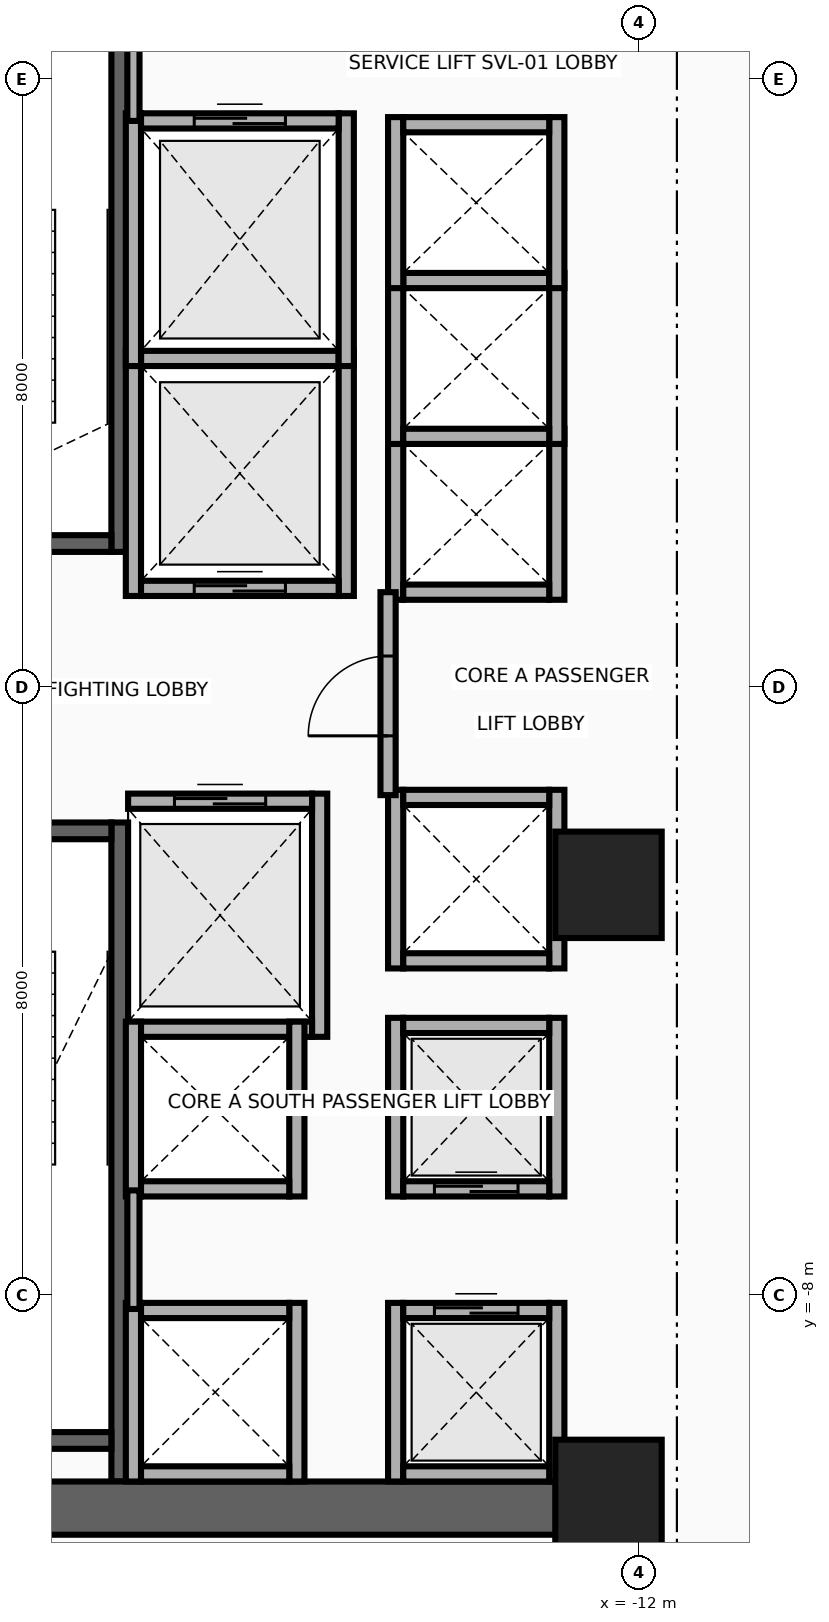
"""IFC4 building model, lengths in metres.
Left out: names, types, materials, properties, quantities, classifications, styles, units other than length and angle.
Written with IfcOpenShell. Run it as: python <this file> out.ifc"""

import sys

from ifc_helpers import new_model, si_unit, direction, frame, frame_2d, origin, origin_2d, place, context, subcontext, project, spatial, rectangle, extrude, source, transform, mapped, element, fill, save


model = new_model("IFC4")
c1 = context("Model", 3, precision=1e-05, world=origin(), true_north=direction((0.0, 1.0)))
c2 = subcontext(c1, "Body", "Model", "MODEL_VIEW")
j1 = project(units=[si_unit("LENGTHUNIT", "METRE"), si_unit("PLANEANGLEUNIT", "RADIAN")], contexts=[c1])
p1 = place(None, origin())
s1 = spatial("IfcSite", under=j1, at=p1, CompositionType="ELEMENT")
p2 = place(p1, origin())
s2 = spatial("IfcBuilding", under=s1, at=p2, CompositionType="ELEMENT")
p3 = place(p2, frame((0.0, 0.0, 29.7)))
s3 = spatial("IfcBuildingStorey", under=s2, at=p3, CompositionType="ELEMENT", Elevation=29.7)
p4 = place(p3, frame((-18.83, 1.78, 0.0), z_axis=(0.0, 0.0, 1.0), x_axis=(0.0, 1.0, 0.0)))
e1 = element("IfcWall", 1, at=p4, inside=s3, PredefinedType="SHEAR", context=c2, shape_type="SweptSolid", body=[
    extrude(rectangle(XDim=8.67, YDim=0.22, at=frame_2d((4.335, 0.0))), origin(), (0.0, 0.0, 1.0), 3.46),
])
p5 = place(p3, frame((-22.05, 1.89, 0.0), z_axis=(0.0, 0.0, 1.0), x_axis=(1.0, 0.0, 0.0)))
e2 = element("IfcWall", 2, at=p5, inside=s3, PredefinedType="SHEAR", context=c2, shape_type="SweptSolid", body=[
    extrude(rectangle(XDim=3.11, YDim=0.22, at=frame_2d((1.555, 0.0))), origin(), (0.0, 0.0, 1.0), 3.46),
])
p6 = place(p5, frame((1.0, 0.0, 0.0)))
e3 = element("IfcOpeningElement", 3, at=p6, cuts=e2, PredefinedType="OPENING", context=c2, shape_type="SweptSolid", body=[
    extrude(rectangle(XDim=1.1, YDim=2.15, at=frame_2d((0.55, 1.075))), frame((0.0, 0.125, 0.0), z_axis=(0.0, -1.0, 0.0), x_axis=(1.0, 0.0, 0.0)), (0.0, 0.0, 1.0), 0.25),
])
p7 = place(p3, frame((-18.83, -10.45, 0.0), z_axis=(0.0, 0.0, 1.0), x_axis=(0.0, 1.0, 0.0)))
e4 = element("IfcWall", 4, at=p7, inside=s3, PredefinedType="SHEAR", context=c2, shape_type="SweptSolid", body=[
    extrude(rectangle(XDim=8.67, YDim=0.22, at=frame_2d((4.335, 0.0))), origin(), (0.0, 0.0, 1.0), 3.46),
])
p8 = place(p3, frame((-22.05, -9.91, 0.0), z_axis=(0.0, 0.0, 1.0), x_axis=(1.0, 0.0, 0.0)))
e5 = element("IfcWall", 5, at=p8, inside=s3, PredefinedType="SHEAR", context=c2, shape_type="SweptSolid", body=[
    extrude(rectangle(XDim=3.11, YDim=0.22, at=frame_2d((1.555, 0.0))), origin(), (0.0, 0.0, 1.0), 3.46),
])
p9 = place(p3, frame((-22.05, -1.89, 0.0), z_axis=(0.0, 0.0, 1.0), x_axis=(1.0, 0.0, 0.0)))
e6 = element("IfcWall", 6, at=p9, inside=s3, PredefinedType="SHEAR", context=c2, shape_type="SweptSolid", body=[
    extrude(rectangle(XDim=3.11, YDim=0.22, at=frame_2d((1.555, 0.0))), origin(), (0.0, 0.0, 1.0), 3.46),
])
p10 = place(p9, frame((1.0, 0.0, 0.0)))
e7 = element("IfcOpeningElement", 7, at=p10, cuts=e6, PredefinedType="OPENING", context=c2, shape_type="SweptSolid", body=[
    extrude(rectangle(XDim=1.1, YDim=2.15, at=frame_2d((0.55, 1.075))), frame((0.0, 0.125, 0.0), z_axis=(0.0, -1.0, 0.0), x_axis=(1.0, 0.0, 0.0)), (0.0, 0.0, 1.0), 0.25),
])
p11 = place(p3, frame((-22.65, -10.8, 0.0), z_axis=(0.0, 0.0, 1.0), x_axis=(1.0, 0.0, 0.0)))
e8 = element("IfcWall", 8, at=p11, inside=s3, PredefinedType="SHEAR", context=c2, shape_type="SweptSolid", body=[
    extrude(rectangle(XDim=10.25, YDim=0.7, at=frame_2d((5.125, 0.0))), origin(), (0.0, 0.0, 1.0), 3.46),
])
m1 = source(origin(), c2, "Body", "SweptSolid", [
    extrude(rectangle(XDim=1.4, YDim=1.4, at=origin_2d()), origin(), (0.0, 0.0, 1.0), 3.7),
])
for number, where, z_axis, x_axis in (
    (9, (-12.4, -10.6, 0.0), (0.0, 0.0, 1.0), (1.0, 0.0, 0.0)),
    (10, (-12.4, -2.6, 0.0), (0.0, 0.0, 1.0), (1.0, 0.0, 0.0)),
):
    element("IfcColumn", number, at=place(p3, frame(where, z_axis=z_axis, x_axis=x_axis)), inside=s3, PredefinedType="COLUMN", context=c2, shape_type="MappedRepresentation", body=[
        mapped(m1, transform((0.0, 0.0, 0.0), x_axis=(1.0, 0.0, 0.0), y_axis=(0.0, 1.0, 0.0), z_axis=(0.0, 0.0, 1.0), scale=1.0)),
    ])
for number, where, z_axis, x_axis in (
    (11, (-18.65, 1.2, 0.0), (0.0, 0.0, 1.0), (0.0, 1.0, 0.0)),
    (12, (-15.85, 1.2, 0.0), (0.0, 0.0, 1.0), (0.0, 1.0, 0.0)),
):
    element("IfcWall", number, at=place(p3, frame(where, z_axis=z_axis, x_axis=x_axis)), inside=s3, PredefinedType="MOVABLE", context=c2, shape_type="SweptSolid", body=[
        extrude(rectangle(XDim=3.225, YDim=0.2, at=frame_2d((1.613, 0.0))), origin(), (0.0, 0.0, 1.0), 3.46),
    ])
p12 = place(p3, frame((-18.55, 1.3, 0.0), z_axis=(0.0, 0.0, 1.0), x_axis=(1.0, 0.0, 0.0)))
e13 = element("IfcWall", 13, at=p12, inside=s3, PredefinedType="MOVABLE", context=c2, shape_type="SweptSolid", body=[
    extrude(rectangle(XDim=2.6, YDim=0.2, at=frame_2d((1.3, 0.0))), origin(), (0.0, 0.0, 1.0), 3.46),
])
p13 = place(p12, frame((0.7, 0.0, 0.0)))
e14 = element("IfcOpeningElement", 14, at=p13, cuts=e13, PredefinedType="OPENING", context=c2, shape_type="SweptSolid", body=[
    extrude(rectangle(XDim=1.2, YDim=2.1, at=frame_2d((0.6, 1.05))), frame((0.0, 0.115, 0.0), z_axis=(0.0, -1.0, 0.0), x_axis=(1.0, 0.0, 0.0)), (0.0, 0.0, 1.0), 0.23),
])
p14 = place(p3, frame((-18.55, 4.325, 0.0), z_axis=(0.0, 0.0, 1.0), x_axis=(1.0, 0.0, 0.0)))
e15 = element("IfcWall", 15, at=p14, inside=s3, PredefinedType="MOVABLE", context=c2, shape_type="SweptSolid", body=[
    extrude(rectangle(XDim=2.6, YDim=0.2, at=frame_2d((1.3, 0.0))), origin(), (0.0, 0.0, 1.0), 3.46),
])
p15 = place(p3, frame((-16.2, -4.6, 0.0), z_axis=(0.0, 0.0, 1.0), x_axis=(0.0, 1.0, 0.0)))
e16 = element("IfcWall", 16, at=p15, inside=s3, PredefinedType="MOVABLE", context=c2, shape_type="SweptSolid", body=[
    extrude(rectangle(XDim=3.2, YDim=0.2, at=frame_2d((1.6, 0.0))), origin(), (0.0, 0.0, 1.0), 3.46),
])
p16 = place(p3, frame((-18.72, -4.5, 0.0), z_axis=(0.0, 0.0, 1.0), x_axis=(1.0, 0.0, 0.0)))
e17 = element("IfcWall", 17, at=p16, inside=s3, PredefinedType="MOVABLE", context=c2, shape_type="SweptSolid", body=[
    extrude(rectangle(XDim=2.42, YDim=0.2, at=frame_2d((1.21, 0.0))), origin(), (0.0, 0.0, 1.0), 3.46),
])
p17 = place(p3, frame((-18.72, -1.5, 0.0), z_axis=(0.0, 0.0, 1.0), x_axis=(1.0, 0.0, 0.0)))
e18 = element("IfcWall", 18, at=p17, inside=s3, PredefinedType="MOVABLE", context=c2, shape_type="SweptSolid", body=[
    extrude(rectangle(XDim=2.42, YDim=0.2, at=frame_2d((1.21, 0.0))), origin(), (0.0, 0.0, 1.0), 3.46),
])
p18 = place(p17, frame((0.61, 0.0, 0.0)))
e19 = element("IfcOpeningElement", 19, at=p18, cuts=e18, PredefinedType="OPENING", context=c2, shape_type="SweptSolid", body=[
    extrude(rectangle(XDim=1.2, YDim=2.1, at=frame_2d((0.6, 1.05))), frame((0.0, 0.115, 0.0), z_axis=(0.0, -1.0, 0.0), x_axis=(1.0, 0.0, 0.0)), (0.0, 0.0, 1.0), 0.23),
])
for number, where, z_axis, x_axis in (
    (20, (-18.65, 4.225, 0.0), (0.0, 0.0, 1.0), (0.0, 1.0, 0.0)),
    (21, (-15.85, 4.225, 0.0), (0.0, 0.0, 1.0), (0.0, 1.0, 0.0)),
):
    element("IfcWall", number, at=place(p3, frame(where, z_axis=z_axis, x_axis=x_axis)), inside=s3, PredefinedType="MOVABLE", context=c2, shape_type="SweptSolid", body=[
        extrude(rectangle(XDim=3.325, YDim=0.2, at=frame_2d((1.663, 0.0))), origin(), (0.0, 0.0, 1.0), 3.46),
    ])
p19 = place(p3, frame((-18.55, 7.45, 0.0), z_axis=(0.0, 0.0, 1.0), x_axis=(1.0, 0.0, 0.0)))
e22 = element("IfcWall", 22, at=p19, inside=s3, PredefinedType="MOVABLE", context=c2, shape_type="SweptSolid", body=[
    extrude(rectangle(XDim=2.6, YDim=0.2, at=frame_2d((1.3, 0.0))), origin(), (0.0, 0.0, 1.0), 3.46),
])
p20 = place(p19, frame((0.7, 0.0, 0.0)))
e23 = element("IfcOpeningElement", 23, at=p20, cuts=e22, PredefinedType="OPENING", context=c2, shape_type="SweptSolid", body=[
    extrude(rectangle(XDim=1.2, YDim=2.1, at=frame_2d((0.6, 1.05))), frame((0.0, 0.115, 0.0), z_axis=(0.0, -1.0, 0.0), x_axis=(1.0, 0.0, 0.0)), (0.0, 0.0, 1.0), 0.23),
])
for number, where, z_axis, x_axis in (
    (24, (-15.2, -10.45, 0.0), (0.0, 0.0, 1.0), (0.0, 1.0, 0.0)),
    (25, (-13.08, -10.45, 0.0), (0.0, 0.0, 1.0), (0.0, 1.0, 0.0)),
):
    element("IfcWall", number, at=place(p3, frame(where, z_axis=z_axis, x_axis=x_axis)), inside=s3, PredefinedType="MOVABLE", context=c2, shape_type="SweptSolid", body=[
        extrude(rectangle(XDim=2.35, YDim=0.2, at=frame_2d((1.175, 0.0))), origin(), (0.0, 0.0, 1.0), 2.583),
    ])
p21 = place(p3, frame((-15.1, -10.35, 0.0), z_axis=(0.0, 0.0, 1.0), x_axis=(1.0, 0.0, 0.0)))
e26 = element("IfcWall", 26, at=p21, inside=s3, PredefinedType="MOVABLE", context=c2, shape_type="SweptSolid", body=[
    extrude(rectangle(XDim=1.92, YDim=0.2, at=frame_2d((0.96, 0.0))), origin(), (0.0, 0.0, 1.0), 2.583),
])
p22 = place(p3, frame((-15.1, -8.2, 0.0), z_axis=(0.0, 0.0, 1.0), x_axis=(1.0, 0.0, 0.0)))
e27 = element("IfcWall", 27, at=p22, inside=s3, PredefinedType="MOVABLE", context=c2, shape_type="SweptSolid", body=[
    extrude(rectangle(XDim=1.92, YDim=0.2, at=frame_2d((0.96, 0.0))), origin(), (0.0, 0.0, 1.0), 3.46),
])
p23 = place(p22, frame((0.41, 0.0, 0.0)))
e28 = element("IfcOpeningElement", 28, at=p23, cuts=e27, PredefinedType="OPENING", context=c2, shape_type="SweptSolid", body=[
    extrude(rectangle(XDim=1.1, YDim=2.1, at=frame_2d((0.55, 1.05))), frame((0.0, 0.115, 0.0), z_axis=(0.0, -1.0, 0.0), x_axis=(1.0, 0.0, 0.0)), (0.0, 0.0, 1.0), 0.23),
])
for number, where, z_axis, x_axis in (
    (29, (-15.2, -6.7, 0.0), (0.0, 0.0, 1.0), (0.0, 1.0, 0.0)),
    (30, (-13.08, -6.7, 0.0), (0.0, 0.0, 1.0), (0.0, 1.0, 0.0)),
):
    element("IfcWall", number, at=place(p3, frame(where, z_axis=z_axis, x_axis=x_axis)), inside=s3, PredefinedType="MOVABLE", context=c2, shape_type="SweptSolid", body=[
        extrude(rectangle(XDim=2.35, YDim=0.2, at=frame_2d((1.175, 0.0))), origin(), (0.0, 0.0, 1.0), 3.46),
    ])
p24 = place(p3, frame((-15.1, -6.6, 0.0), z_axis=(0.0, 0.0, 1.0), x_axis=(1.0, 0.0, 0.0)))
e31 = element("IfcWall", 31, at=p24, inside=s3, PredefinedType="MOVABLE", context=c2, shape_type="SweptSolid", body=[
    extrude(rectangle(XDim=1.92, YDim=0.2, at=frame_2d((0.96, 0.0))), origin(), (0.0, 0.0, 1.0), 3.46),
])
p25 = place(p24, frame((0.41, 0.0, 0.0)))
e32 = element("IfcOpeningElement", 32, at=p25, cuts=e31, PredefinedType="OPENING", context=c2, shape_type="SweptSolid", body=[
    extrude(rectangle(XDim=1.1, YDim=2.1, at=frame_2d((0.55, 1.05))), frame((0.0, 0.115, 0.0), z_axis=(0.0, -1.0, 0.0), x_axis=(1.0, 0.0, 0.0)), (0.0, 0.0, 1.0), 0.23),
])
p26 = place(p3, frame((-15.1, -4.45, 0.0), z_axis=(0.0, 0.0, 1.0), x_axis=(1.0, 0.0, 0.0)))
e33 = element("IfcWall", 33, at=p26, inside=s3, PredefinedType="MOVABLE", context=c2, shape_type="SweptSolid", body=[
    extrude(rectangle(XDim=1.92, YDim=0.2, at=frame_2d((0.96, 0.0))), origin(), (0.0, 0.0, 1.0), 3.46),
])
for number, where, z_axis, x_axis in (
    (34, (-18.65, -10.45, 0.0), (0.0, 0.0, 1.0), (0.0, 1.0, 0.0)),
    (35, (-16.5, -10.45, 0.0), (0.0, 0.0, 1.0), (0.0, 1.0, 0.0)),
):
    element("IfcWall", number, at=place(p3, frame(where, z_axis=z_axis, x_axis=x_axis)), inside=s3, PredefinedType="MOVABLE", context=c2, shape_type="SweptSolid", body=[
        extrude(rectangle(XDim=2.35, YDim=0.2, at=frame_2d((1.175, 0.0))), origin(), (0.0, 0.0, 1.0), 2.583),
    ])
p27 = place(p3, frame((-18.55, -10.35, 0.0), z_axis=(0.0, 0.0, 1.0), x_axis=(1.0, 0.0, 0.0)))
e36 = element("IfcWall", 36, at=p27, inside=s3, PredefinedType="MOVABLE", context=c2, shape_type="SweptSolid", body=[
    extrude(rectangle(XDim=1.95, YDim=0.2, at=frame_2d((0.975, 0.0))), origin(), (0.0, 0.0, 1.0), 2.583),
])
p28 = place(p3, frame((-18.55, -8.2, 0.0), z_axis=(0.0, 0.0, 1.0), x_axis=(1.0, 0.0, 0.0)))
e37 = element("IfcWall", 37, at=p28, inside=s3, PredefinedType="MOVABLE", context=c2, shape_type="SweptSolid", body=[
    extrude(rectangle(XDim=1.95, YDim=0.2, at=frame_2d((0.975, 0.0))), origin(), (0.0, 0.0, 1.0), 3.46),
])
for number, where, z_axis, x_axis in (
    (38, (-15.2, 1.15, 0.0), (0.0, 0.0, 1.0), (0.0, 1.0, 0.0)),
    (39, (-13.08, 1.15, 0.0), (0.0, 0.0, 1.0), (0.0, 1.0, 0.0)),
):
    element("IfcWall", number, at=place(p3, frame(where, z_axis=z_axis, x_axis=x_axis)), inside=s3, PredefinedType="MOVABLE", context=c2, shape_type="SweptSolid", body=[
        extrude(rectangle(XDim=2.25, YDim=0.2, at=frame_2d((1.125, 0.0))), origin(), (0.0, 0.0, 1.0), 3.46),
    ])
p29 = place(p3, frame((-15.1, 1.25, 0.0), z_axis=(0.0, 0.0, 1.0), x_axis=(1.0, 0.0, 0.0)))
e40 = element("IfcWall", 40, at=p29, inside=s3, PredefinedType="MOVABLE", context=c2, shape_type="SweptSolid", body=[
    extrude(rectangle(XDim=1.92, YDim=0.2, at=frame_2d((0.96, 0.0))), origin(), (0.0, 0.0, 1.0), 3.46),
])
for number, where, z_axis, x_axis in (
    (41, (-15.2, 3.2, 0.0), (0.0, 0.0, 1.0), (0.0, 1.0, 0.0)),
    (42, (-13.08, 3.2, 0.0), (0.0, 0.0, 1.0), (0.0, 1.0, 0.0)),
):
    element("IfcWall", number, at=place(p3, frame(where, z_axis=z_axis, x_axis=x_axis)), inside=s3, PredefinedType="MOVABLE", context=c2, shape_type="SweptSolid", body=[
        extrude(rectangle(XDim=2.25, YDim=0.2, at=frame_2d((1.125, 0.0))), origin(), (0.0, 0.0, 1.0), 3.46),
    ])
for number, where, z_axis, x_axis in (
    (43, (-15.1, 3.3, 0.0), (0.0, 0.0, 1.0), (1.0, 0.0, 0.0)),
    (44, (-15.1, 5.35, 0.0), (0.0, 0.0, 1.0), (1.0, 0.0, 0.0)),
):
    element("IfcWall", number, at=place(p3, frame(where, z_axis=z_axis, x_axis=x_axis)), inside=s3, PredefinedType="MOVABLE", context=c2, shape_type="SweptSolid", body=[
        extrude(rectangle(XDim=1.92, YDim=0.2, at=frame_2d((0.96, 0.0))), origin(), (0.0, 0.0, 1.0), 3.46),
    ])
for number, where, z_axis, x_axis in (
    (45, (-15.2, 5.25, 0.0), (0.0, 0.0, 1.0), (0.0, 1.0, 0.0)),
    (46, (-13.08, 5.25, 0.0), (0.0, 0.0, 1.0), (0.0, 1.0, 0.0)),
):
    element("IfcWall", number, at=place(p3, frame(where, z_axis=z_axis, x_axis=x_axis)), inside=s3, PredefinedType="MOVABLE", context=c2, shape_type="SweptSolid", body=[
        extrude(rectangle(XDim=2.25, YDim=0.2, at=frame_2d((1.125, 0.0))), origin(), (0.0, 0.0, 1.0), 3.46),
    ])
p30 = place(p3, frame((-15.1, 7.4, 0.0), z_axis=(0.0, 0.0, 1.0), x_axis=(1.0, 0.0, 0.0)))
e47 = element("IfcWall", 47, at=p30, inside=s3, PredefinedType="MOVABLE", context=c2, shape_type="SweptSolid", body=[
    extrude(rectangle(XDim=1.92, YDim=0.2, at=frame_2d((0.96, 0.0))), origin(), (0.0, 0.0, 1.0), 3.46),
])
for number, where, z_axis, x_axis in (
    (48, (-18.65, -6.7, 0.0), (0.0, 0.0, 1.0), (0.0, 1.0, 0.0)),
    (49, (-16.5, -6.7, 0.0), (0.0, 0.0, 1.0), (0.0, 1.0, 0.0)),
):
    element("IfcWall", number, at=place(p3, frame(where, z_axis=z_axis, x_axis=x_axis)), inside=s3, PredefinedType="MOVABLE", context=c2, shape_type="SweptSolid", body=[
        extrude(rectangle(XDim=2.3, YDim=0.2, at=frame_2d((1.15, 0.0))), origin(), (0.0, 0.0, 1.0), 3.46),
    ])
p31 = place(p3, frame((-18.55, -6.6, 0.0), z_axis=(0.0, 0.0, 1.0), x_axis=(1.0, 0.0, 0.0)))
e50 = element("IfcWall", 50, at=p31, inside=s3, PredefinedType="MOVABLE", context=c2, shape_type="SweptSolid", body=[
    extrude(rectangle(XDim=1.95, YDim=0.2, at=frame_2d((0.975, 0.0))), origin(), (0.0, 0.0, 1.0), 3.46),
])
for number, where, z_axis, x_axis in (
    (51, (-15.2, -3.7, 0.0), (0.0, 0.0, 1.0), (0.0, 1.0, 0.0)),
    (52, (-13.08, -3.7, 0.0), (0.0, 0.0, 1.0), (0.0, 1.0, 0.0)),
):
    element("IfcWall", number, at=place(p3, frame(where, z_axis=z_axis, x_axis=x_axis)), inside=s3, PredefinedType="MOVABLE", context=c2, shape_type="SweptSolid", body=[
        extrude(rectangle(XDim=2.35, YDim=0.2, at=frame_2d((1.175, 0.0))), origin(), (0.0, 0.0, 1.0), 3.46),
    ])
for number, where, z_axis, x_axis in (
    (53, (-15.1, -3.6, 0.0), (0.0, 0.0, 1.0), (1.0, 0.0, 0.0)),
    (54, (-15.1, -1.45, 0.0), (0.0, 0.0, 1.0), (1.0, 0.0, 0.0)),
):
    element("IfcWall", number, at=place(p3, frame(where, z_axis=z_axis, x_axis=x_axis)), inside=s3, PredefinedType="MOVABLE", context=c2, shape_type="SweptSolid", body=[
        extrude(rectangle(XDim=1.92, YDim=0.2, at=frame_2d((0.96, 0.0))), origin(), (0.0, 0.0, 1.0), 3.46),
    ])
p32 = place(p3, frame((-15.3, -1.42, 0.0), z_axis=(0.0, 0.0, 1.0), x_axis=(0.0, 1.0, 0.0)))
e55 = element("IfcWall", 55, at=p32, inside=s3, PredefinedType="PARTITIONING", context=c2, shape_type="SweptSolid", body=[
    extrude(rectangle(XDim=2.67, YDim=0.2, at=frame_2d((1.335, 0.0))), origin(), (0.0, 0.0, 1.0), 3.46),
])
p33 = place(p32, frame((0.78, 0.0, 0.0)))
e56 = element("IfcOpeningElement", 56, at=p33, cuts=e55, PredefinedType="OPENING", context=c2, shape_type="SweptSolid", body=[
    extrude(rectangle(XDim=1.05, YDim=2.15, at=frame_2d((0.525, 1.075))), frame((0.0, 0.115, 0.0), z_axis=(0.0, -1.0, 0.0), x_axis=(1.0, 0.0, 0.0)), (0.0, 0.0, 1.0), 0.23),
])
p34 = place(p3, frame((-18.65, 7.45, 0.0), z_axis=(0.0, 0.0, 1.0), x_axis=(0.0, 1.0, 0.0)))
e57 = element("IfcWall", 57, at=p34, inside=s3, PredefinedType="PARTITIONING", context=c2, shape_type="SweptSolid", body=[
    extrude(rectangle(XDim=2.93, YDim=0.16, at=frame_2d((1.465, 0.0))), origin(), (0.0, 0.0, 1.0), 3.46),
])
p35 = place(p3, frame((-18.65, -8.18, 0.0), z_axis=(0.0, 0.0, 1.0), x_axis=(0.0, 1.0, 0.0)))
e58 = element("IfcWall", 58, at=p35, inside=s3, PredefinedType="PARTITIONING", context=c2, shape_type="SweptSolid", body=[
    extrude(rectangle(XDim=1.56, YDim=0.16, at=frame_2d((0.78, 0.0))), origin(), (0.0, 0.0, 1.0), 3.46),
])
p36 = place(p13, origin())
e59 = element("IfcDoor", 59, at=p36, inside=s3, OperationType="DOUBLE_DOOR_SLIDING", PredefinedType="DOOR", context=c2, shape_type="SweptSolid", body=[
    extrude(rectangle(XDim=1.2, YDim=2.1, at=frame_2d((0.6, 1.05))), frame((0.0, 0.025, 0.0), z_axis=(0.0, -1.0, 0.0), x_axis=(1.0, 0.0, 0.0)), (0.0, 0.0, 1.0), 0.05),
])
fill(e14, e59)
p37 = place(p18, origin())
e60 = element("IfcDoor", 60, at=p37, inside=s3, OperationType="DOUBLE_DOOR_SLIDING", PredefinedType="DOOR", context=c2, shape_type="SweptSolid", body=[
    extrude(rectangle(XDim=1.2, YDim=2.1, at=frame_2d((0.6, 1.05))), frame((0.0, 0.025, 0.0), z_axis=(0.0, -1.0, 0.0), x_axis=(1.0, 0.0, 0.0)), (0.0, 0.0, 1.0), 0.05),
])
fill(e19, e60)
p38 = place(p20, origin())
e61 = element("IfcDoor", 61, at=p38, inside=s3, OperationType="DOUBLE_DOOR_SLIDING", PredefinedType="DOOR", context=c2, shape_type="SweptSolid", body=[
    extrude(rectangle(XDim=1.2, YDim=2.1, at=frame_2d((0.6, 1.05))), frame((0.0, 0.025, 0.0), z_axis=(0.0, -1.0, 0.0), x_axis=(1.0, 0.0, 0.0)), (0.0, 0.0, 1.0), 0.05),
])
fill(e23, e61)
p39 = place(p23, origin())
e62 = element("IfcDoor", 62, at=p39, inside=s3, OperationType="DOUBLE_DOOR_SLIDING", PredefinedType="DOOR", context=c2, shape_type="SweptSolid", body=[
    extrude(rectangle(XDim=1.1, YDim=2.1, at=frame_2d((0.55, 1.05))), frame((0.0, 0.025, 0.0), z_axis=(0.0, -1.0, 0.0), x_axis=(1.0, 0.0, 0.0)), (0.0, 0.0, 1.0), 0.05),
])
fill(e28, e62)
p40 = place(p25, origin())
e63 = element("IfcDoor", 63, at=p40, inside=s3, OperationType="DOUBLE_DOOR_SLIDING", PredefinedType="DOOR", context=c2, shape_type="SweptSolid", body=[
    extrude(rectangle(XDim=1.1, YDim=2.1, at=frame_2d((0.55, 1.05))), frame((0.0, 0.025, 0.0), z_axis=(0.0, -1.0, 0.0), x_axis=(1.0, 0.0, 0.0)), (0.0, 0.0, 1.0), 0.05),
])
fill(e32, e63)
p41 = place(p33, origin())
e64 = element("IfcDoor", 64, at=p41, inside=s3, OperationType="SINGLE_SWING_RIGHT", PredefinedType="DOOR", context=c2, shape_type="SweptSolid", body=[
    extrude(rectangle(XDim=1.05, YDim=2.15, at=frame_2d((0.525, 1.075))), frame((0.0, 0.025, 0.0), z_axis=(0.0, -1.0, 0.0), x_axis=(1.0, 0.0, 0.0)), (0.0, 0.0, 1.0), 0.05),
])
fill(e56, e64)
save(model, sys.argv[1])
